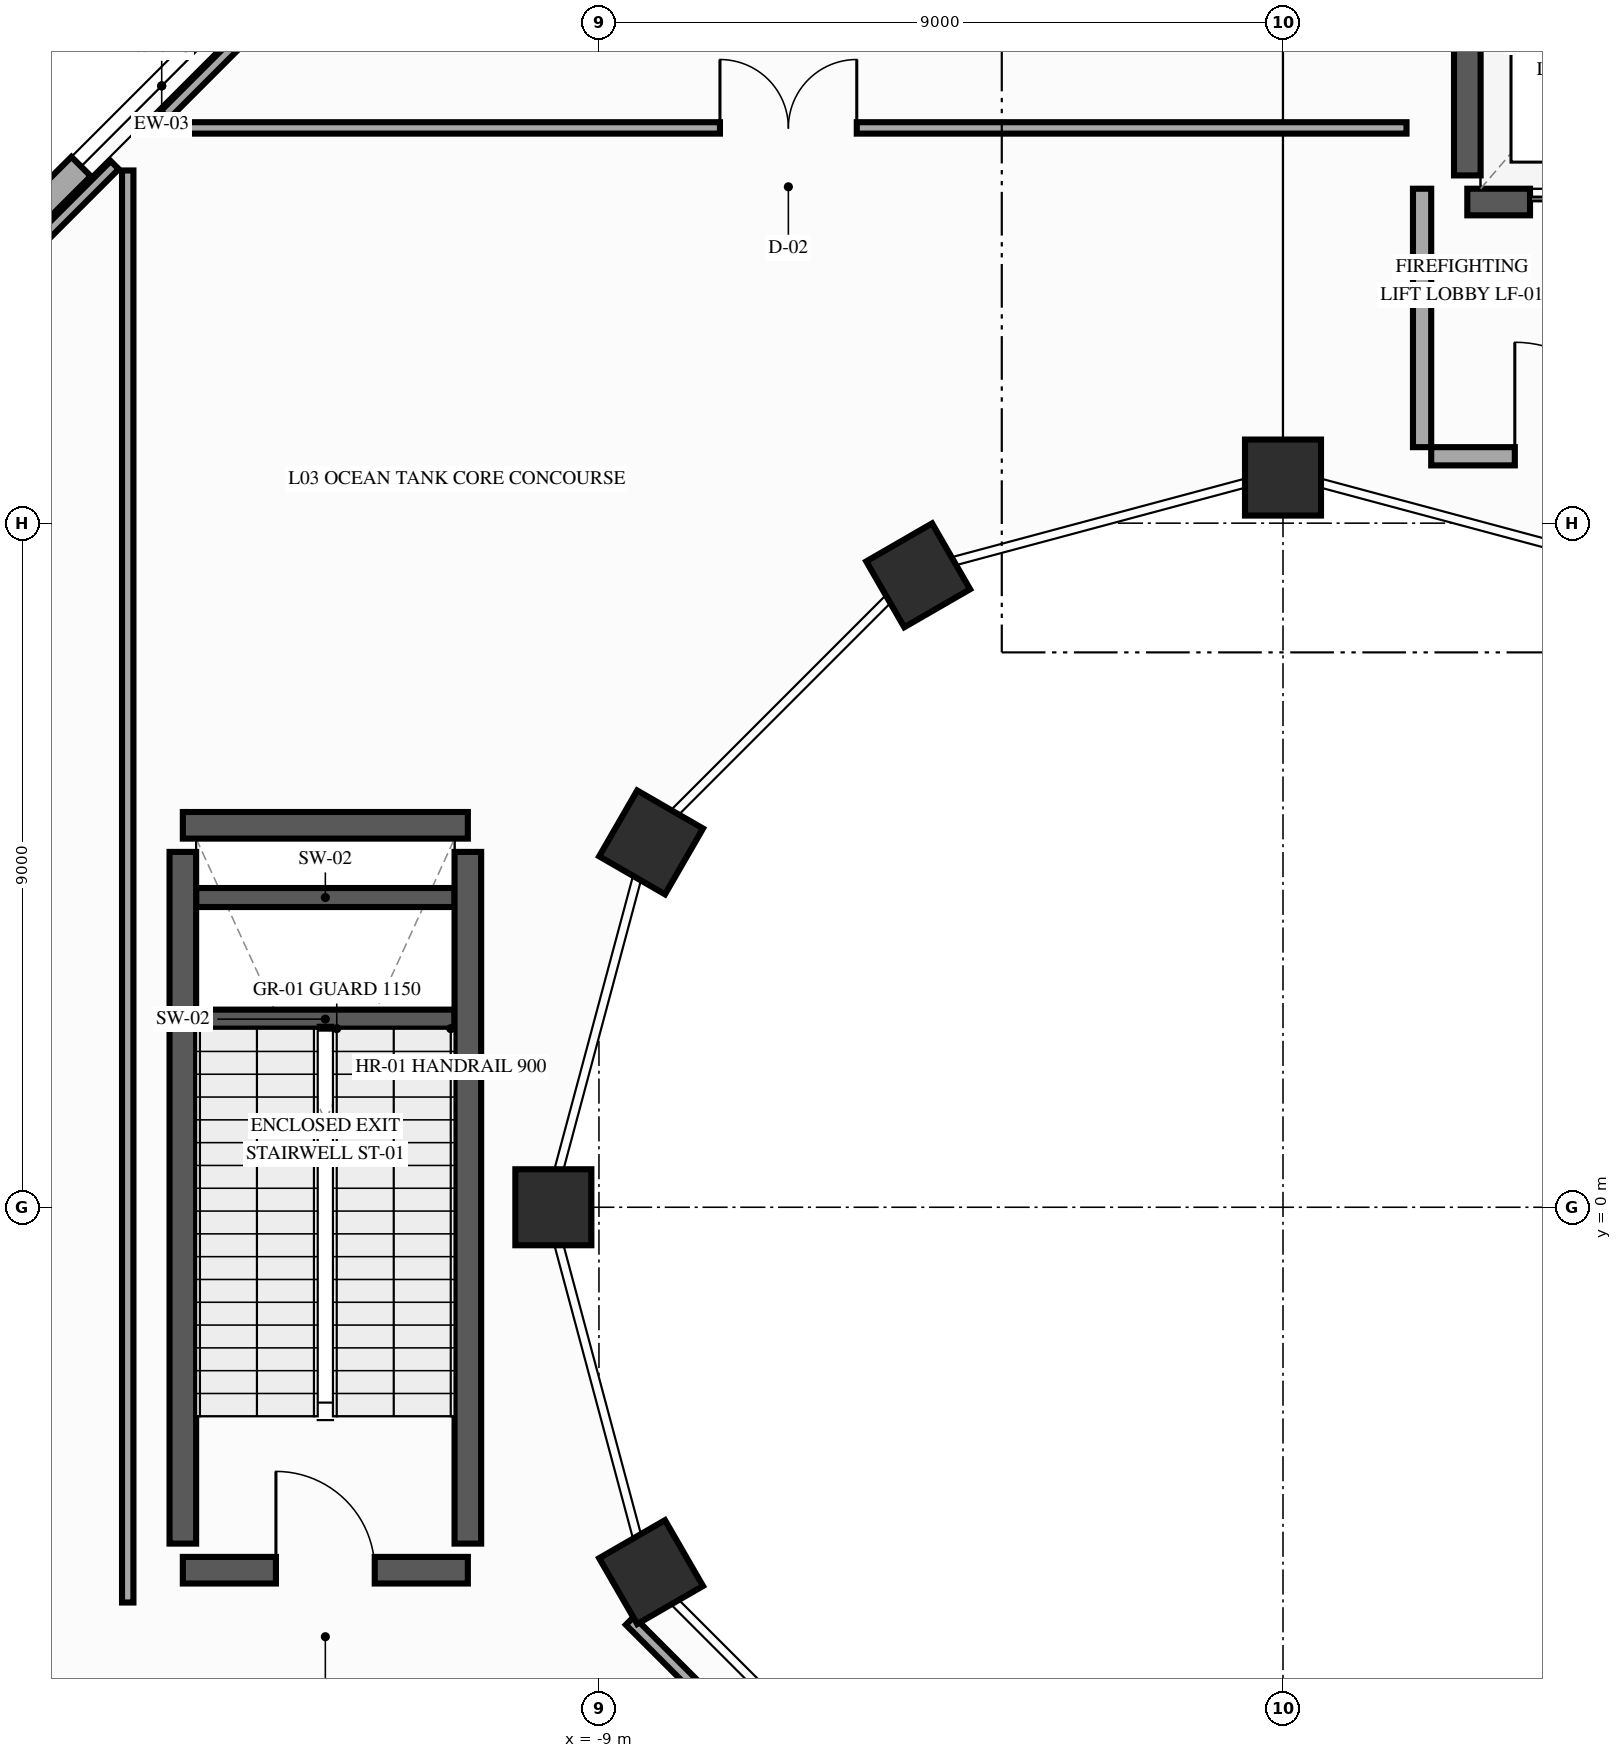
"""IFC4 building model, lengths in metres.
Left out: names, types, materials, properties, quantities, classifications, styles, units other than length and angle.
Written with IfcOpenShell. Run it as: python <this file> out.ifc"""

import sys

from ifc_helpers import new_model, si_unit, direction, frame, frame_2d, origin, origin_2d, place, context, subcontext, project, spatial, rectangle, extrude, element, fill, save


model = new_model("IFC4")
c1 = context("Model", 3, precision=1e-05, world=origin(), true_north=direction((0.0, 1.0)))
c2 = subcontext(c1, "Body", "Model", "MODEL_VIEW")
j1 = project(units=[si_unit("LENGTHUNIT", "METRE"), si_unit("PLANEANGLEUNIT", "RADIAN")], contexts=[c1])
p1 = place(None, origin())
s1 = spatial("IfcSite", under=j1, at=p1, CompositionType="ELEMENT")
p2 = place(p1, origin())
s2 = spatial("IfcBuilding", under=s1, at=p2, CompositionType="ELEMENT")
p3 = place(p2, frame((0.0, 0.0, 16.2)))
s3 = spatial("IfcBuildingStorey", under=s2, at=p3, CompositionType="ELEMENT", Elevation=16.2)
for number, where, z_axis, x_axis in (
    (1, (0.0, 9.6, 0.0), (0.0, 0.0, 1.0), (0.0, 1.0, 0.0)),
    (2, (-4.8, 8.314, 0.0), (0.0, 0.0, 1.0), (-0.5, 0.866, 0.0)),
    (3, (-8.314, 4.8, 0.0), (0.0, 0.0, 1.0), (-0.866, 0.5, 0.0)),
    (4, (-9.6, 0.0, 0.0), (0.0, 0.0, 1.0), (-1.0, 0.0, 0.0)),
    (5, (-8.314, -4.8, 0.0), (0.0, 0.0, 1.0), (-0.866, -0.5, 0.0)),
):
    element("IfcColumn", number, at=place(p3, frame(where, z_axis=z_axis, x_axis=x_axis)), inside=s3, PredefinedType="COLUMN", context=c2, shape_type="SweptSolid", body=[
        extrude(rectangle(XDim=1.0, YDim=1.0, at=origin_2d()), origin(), (0.0, 0.0, 1.0), 5.4),
    ])
p4 = place(p3, frame((-18.285, 11.221, 0.0), z_axis=(0.0, 0.0, 1.0), x_axis=(0.707106781187, 0.707106781187, 0.0)))
e6 = element("IfcWall", 6, at=p4, inside=s3, PredefinedType="SOLIDWALL", context=c2, shape_type="SweptSolid", body=[
    extrude(rectangle(XDim=9.99, YDim=0.36, at=frame_2d((4.995, 0.0))), origin(), (0.0, 0.0, 1.0), 4.385),
])
p5 = place(p4, frame((3.495, 0.0, 0.9)))
e7 = element("IfcOpeningElement", 7, at=p5, cuts=e6, PredefinedType="OPENING", context=c2, shape_type="SweptSolid", body=[
    extrude(rectangle(XDim=3.0, YDim=2.0, at=frame_2d((1.5, 1.0))), frame((0.0, 0.19, 0.0), z_axis=(0.0, -1.0, 0.0), x_axis=(1.0, 0.0, 0.0)), (0.0, 0.0, 1.0), 0.38),
])
for number, where, z_axis, x_axis in (
    (8, (-14.3, 2.475, 0.0), (0.0, 0.0, 1.0), (1.0, 0.0, 0.0)),
    (9, (-14.3, 4.075, 0.0), (0.0, 0.0, 1.0), (1.0, 0.0, 0.0)),
):
    element("IfcWall", number, at=place(p3, frame(where, z_axis=z_axis, x_axis=x_axis)), inside=s3, PredefinedType="SHEAR", context=c2, shape_type="SweptSolid", body=[
        extrude(rectangle(XDim=3.4, YDim=0.25, at=frame_2d((1.7, 0.0))), origin(), (0.0, 0.0, 1.0), 2.5),
    ])
p6 = place(p3, frame((-14.475, -4.775, 0.0), z_axis=(0.0, 0.0, 1.0), x_axis=(1.0, 0.0, 0.0)))
e10 = element("IfcWall", 10, at=p6, inside=s3, PredefinedType="SHEAR", context=c2, shape_type="SweptSolid", body=[
    extrude(rectangle(XDim=3.75, YDim=0.35, at=frame_2d((1.875, 0.0))), origin(), (0.0, 0.0, 1.0), 5.15),
])
p7 = place(p6, frame((1.225, 0.0, 0.0)))
e11 = element("IfcOpeningElement", 11, at=p7, cuts=e10, PredefinedType="OPENING", context=c2, shape_type="SweptSolid", body=[
    extrude(rectangle(XDim=1.3, YDim=2.2, at=frame_2d((0.65, 1.1))), frame((0.0, 0.185, 0.0), z_axis=(0.0, -1.0, 0.0), x_axis=(1.0, 0.0, 0.0)), (0.0, 0.0, 1.0), 0.37),
])
p8 = place(p3, frame((-14.475, 5.025, 0.0), z_axis=(0.0, 0.0, 1.0), x_axis=(1.0, 0.0, 0.0)))
e12 = element("IfcWall", 12, at=p8, inside=s3, PredefinedType="SHEAR", context=c2, shape_type="SweptSolid", body=[
    extrude(rectangle(XDim=3.75, YDim=0.35, at=frame_2d((1.875, 0.0))), origin(), (0.0, 0.0, 1.0), 5.15),
])
for number, where, z_axis, x_axis in (
    (13, (-14.475, -4.425, 0.0), (0.0, 0.0, 1.0), (0.0, 1.0, 0.0)),
    (14, (-10.725, -4.425, 0.0), (0.0, 0.0, 1.0), (0.0, 1.0, 0.0)),
):
    element("IfcWall", number, at=place(p3, frame(where, z_axis=z_axis, x_axis=x_axis)), inside=s3, PredefinedType="SHEAR", context=c2, shape_type="SweptSolid", body=[
        extrude(rectangle(XDim=9.1, YDim=0.35, at=frame_2d((4.55, 0.0))), origin(), (0.0, 0.0, 1.0), 5.15),
    ])
p9 = place(p3, frame((2.425, 13.225, 0.0), z_axis=(0.0, 0.0, 1.0), x_axis=(1.0, 0.0, 0.0)))
e15 = element("IfcWall", 15, at=p9, inside=s3, PredefinedType="SHEAR", context=c2, shape_type="SweptSolid", body=[
    extrude(rectangle(XDim=2.75, YDim=0.35, at=frame_2d((1.375, 0.0))), origin(), (0.0, 0.0, 1.0), 5.15),
])
p10 = place(p9, frame((0.825, 0.0, 0.0)))
e16 = element("IfcOpeningElement", 16, at=p10, cuts=e15, PredefinedType="OPENING", context=c2, shape_type="SweptSolid", body=[
    extrude(rectangle(XDim=1.1, YDim=2.2, at=frame_2d((0.55, 1.1))), frame((0.0, 0.185, 0.0), z_axis=(0.0, -1.0, 0.0), x_axis=(1.0, 0.0, 0.0)), (0.0, 0.0, 1.0), 0.37),
])
p11 = place(p3, frame((2.425, 13.575, 0.0), z_axis=(0.0, 0.0, 1.0), x_axis=(0.0, 1.0, 0.0)))
e17 = element("IfcWall", 17, at=p11, inside=s3, PredefinedType="SHEAR", context=c2, shape_type="SweptSolid", body=[
    extrude(rectangle(XDim=2.45, YDim=0.35, at=frame_2d((1.225, 0.0))), origin(), (0.0, 0.0, 1.0), 5.15),
])
p12 = place(p3, frame((1.95, 9.88, 0.0), z_axis=(0.0, 0.0, 1.0), x_axis=(1.0, 0.0, 0.0)))
e18 = element("IfcWall", 18, at=p12, inside=s3, PredefinedType="PARTITIONING", context=c2, shape_type="SweptSolid", body=[
    extrude(rectangle(XDim=3.7, YDim=0.24, at=frame_2d((1.85, 0.0))), origin(), (0.0, 0.0, 1.0), 4.535),
])
p13 = place(p12, frame((1.1, 0.0, 0.0)))
e19 = element("IfcOpeningElement", 19, at=p13, cuts=e18, PredefinedType="OPENING", context=c2, shape_type="SweptSolid", body=[
    extrude(rectangle(XDim=1.5, YDim=2.2, at=frame_2d((0.75, 1.1))), frame((0.0, 0.13, 0.0), z_axis=(0.0, -1.0, 0.0), x_axis=(1.0, 0.0, 0.0)), (0.0, 0.0, 1.0), 0.26),
])
p14 = place(p3, frame((1.83, 10.0, 0.0), z_axis=(0.0, 0.0, 1.0), x_axis=(0.0, 1.0, 0.0)))
e20 = element("IfcWall", 20, at=p14, inside=s3, PredefinedType="PARTITIONING", context=c2, shape_type="SweptSolid", body=[
    extrude(rectangle(XDim=3.4, YDim=0.24, at=frame_2d((1.7, 0.0))), origin(), (0.0, 0.0, 1.0), 5.1),
])
p15 = place(p3, frame((-5.44, -8.593, 0.0), z_axis=(0.0, 0.0, 1.0), x_axis=(-0.707106781187, 0.707106781187, 0.0)))
e21 = element("IfcWall", 21, at=p15, inside=s3, PredefinedType="PARTITIONING", context=c2, shape_type="SweptSolid", body=[
    extrude(rectangle(XDim=4.459, YDim=0.15, at=frame_2d((2.229, 0.0))), origin(), (0.0, 0.0, 1.0), 4.535),
])
p16 = place(p3, frame((-15.2, -5.2, 0.0), z_axis=(0.0, 0.0, 1.0), x_axis=(0.0, 1.0, 0.0)))
e22 = element("IfcWall", 22, at=p16, inside=s3, PredefinedType="PARTITIONING", context=c2, shape_type="SweptSolid", body=[
    extrude(rectangle(XDim=18.84, YDim=0.15, at=frame_2d((9.42, 0.0))), origin(), (0.0, 0.0, 1.0), 4.385),
])
p17 = place(p3, frame((-15.371, 13.711, 0.0), z_axis=(0.0, 0.0, 1.0), x_axis=(-0.706972707094, -0.707240829862, 0.0)))
e23 = element("IfcWall", 23, at=p17, inside=s3, PredefinedType="PARTITIONING", context=c2, shape_type="SweptSolid", body=[
    extrude(rectangle(XDim=3.642, YDim=0.15, at=frame_2d((1.821, 0.0))), origin(), (0.0, 0.0, 1.0), 4.385),
])
p18 = place(p3, frame((-14.64, 14.2, 0.0), z_axis=(0.0, 0.0, 1.0), x_axis=(1.0, 0.0, 0.0)))
e24 = element("IfcWall", 24, at=p18, inside=s3, PredefinedType="PARTITIONING", context=c2, shape_type="SweptSolid", body=[
    extrude(rectangle(XDim=16.265, YDim=0.15, at=frame_2d((8.132, 0.0))), origin(), (0.0, 0.0, 1.0), 4.385),
])
p19 = place(p18, frame((7.232, 0.0, 0.0)))
e25 = element("IfcOpeningElement", 25, at=p19, cuts=e24, PredefinedType="OPENING", context=c2, shape_type="SweptSolid", body=[
    extrude(rectangle(XDim=1.8, YDim=2.3, at=frame_2d((0.9, 1.15))), frame((0.0, 0.085, 0.0), z_axis=(0.0, -1.0, 0.0), x_axis=(1.0, 0.0, 0.0)), (0.0, 0.0, 1.0), 0.17),
])
p20 = place(p3, frame((-11.136, 17.946, 0.0), z_axis=(0.0, 0.0, 1.0), x_axis=(-0.707106781187, -0.707106781187, 0.0)))
e26 = element("IfcWall", 26, at=p20, inside=s3, PredefinedType="PARTITIONING", context=c2, shape_type="SweptSolid", body=[
    extrude(rectangle(XDim=5.056, YDim=0.15, at=frame_2d((2.528, 0.0))), origin(), (0.0, 0.0, 1.0), 4.385),
])
p21 = place(p5, origin())
e27 = element("IfcWindow", 27, at=p21, inside=s3, PartitioningType="SINGLE_PANEL", PredefinedType="WINDOW", context=c2, shape_type="SweptSolid", body=[
    extrude(rectangle(XDim=3.0, YDim=2.0, at=frame_2d((1.5, 1.0))), frame((0.0, 0.03, 0.0), z_axis=(0.0, -1.0, 0.0), x_axis=(1.0, 0.0, 0.0)), (0.0, 0.0, 1.0), 0.06),
])
fill(e7, e27)
p22 = place(p7, origin())
e28 = element("IfcDoor", 28, at=p22, inside=s3, OperationType="SINGLE_SWING_LEFT", PredefinedType="DOOR", context=c2, shape_type="SweptSolid", body=[
    extrude(rectangle(XDim=1.3, YDim=2.2, at=frame_2d((0.65, 1.1))), frame((0.0, 0.025, 0.0), z_axis=(0.0, -1.0, 0.0), x_axis=(1.0, 0.0, 0.0)), (0.0, 0.0, 1.0), 0.05),
])
fill(e11, e28)
p23 = place(p10, origin())
e29 = element("IfcDoor", 29, at=p23, inside=s3, OperationType="DOUBLE_DOOR_SLIDING", PredefinedType="DOOR", context=c2, shape_type="SweptSolid", body=[
    extrude(rectangle(XDim=1.1, YDim=2.2, at=frame_2d((0.55, 1.1))), frame((0.0, 0.025, 0.0), z_axis=(0.0, -1.0, 0.0), x_axis=(1.0, 0.0, 0.0)), (0.0, 0.0, 1.0), 0.05),
])
fill(e16, e29)
p24 = place(p13, origin())
e30 = element("IfcDoor", 30, at=p24, inside=s3, OperationType="SINGLE_SWING_LEFT", PredefinedType="DOOR", context=c2, shape_type="SweptSolid", body=[
    extrude(rectangle(XDim=1.5, YDim=2.2, at=frame_2d((0.75, 1.1))), frame((0.0, 0.025, 0.0), z_axis=(0.0, -1.0, 0.0), x_axis=(1.0, 0.0, 0.0)), (0.0, 0.0, 1.0), 0.05),
])
fill(e19, e30)
p25 = place(p19, origin())
e31 = element("IfcDoor", 31, at=p25, inside=s3, OperationType="DOUBLE_DOOR_SINGLE_SWING", PredefinedType="DOOR", context=c2, shape_type="SweptSolid", body=[
    extrude(rectangle(XDim=1.8, YDim=2.3, at=frame_2d((0.9, 1.15))), frame((0.0, 0.025, 0.0), z_axis=(0.0, -1.0, 0.0), x_axis=(1.0, 0.0, 0.0)), (0.0, 0.0, 1.0), 0.05),
])
fill(e25, e31)
save(model, sys.argv[1])
